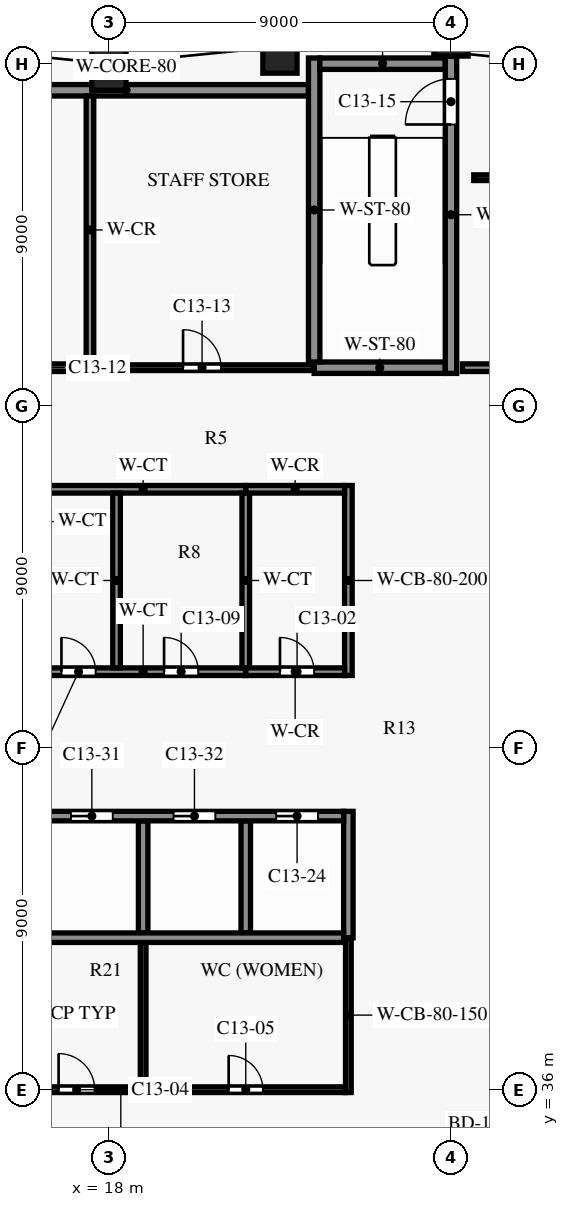
"""IFC4 building model, lengths in metres.
Left out: names, types, materials, properties, quantities, classifications, styles, units other than length and angle.
Written with IfcOpenShell. Run it as: python <this file> out.ifc"""

import sys

from ifc_helpers import new_model, si_unit, direction, frame, frame_2d, origin, origin_2d, place, context, subcontext, project, spatial, rectangle, extrude, element, fill, save


model = new_model("IFC4")
c1 = context("Model", 3, precision=1e-05, world=origin(), true_north=direction((0.0, 1.0)))
c2 = subcontext(c1, "Body", "Model", "MODEL_VIEW")
j1 = project(units=[si_unit("LENGTHUNIT", "METRE"), si_unit("PLANEANGLEUNIT", "RADIAN")], contexts=[c1])
p1 = place(None, origin())
s1 = spatial("IfcSite", under=j1, at=p1, CompositionType="ELEMENT")
p2 = place(p1, origin())
s2 = spatial("IfcBuilding", under=s1, at=p2, CompositionType="ELEMENT")
p3 = place(p2, frame((0.0, 0.0, 84.3)))
s3 = spatial("IfcBuildingStorey", under=s2, at=p3, CompositionType="ELEMENT", Elevation=84.3)
for number, where, z_axis, x_axis in (
    (1, (27.0, 63.9, 0.0), (0.0, 0.0, 1.0), (-1.0, 0.0, 0.0)),
    (2, (22.5, 63.45, 0.0), (0.0, 0.0, 1.0), (-0.995, -0.1, 0.0)),
    (3, (18.0, 63.0, 0.0), (0.0, 0.0, 1.0), (-1.0, 0.0, 0.0)),
):
    element("IfcColumn", number, at=place(p3, frame(where, z_axis=z_axis, x_axis=x_axis)), inside=s3, PredefinedType="COLUMN", context=c2, shape_type="SweptSolid", body=[
        extrude(rectangle(XDim=0.9, YDim=1.4, at=origin_2d()), origin(), (0.0, 0.0, 1.0), 4.2),
    ])
p4 = place(p3, frame((12.4, 36.0, 0.0), z_axis=(0.0, 0.0, 1.0), x_axis=(1.0, 0.0, 0.0)))
e4 = element("IfcWall", 4, at=p4, inside=s3, PredefinedType="SHEAR", context=c2, shape_type="SweptSolid", body=[
    extrude(rectangle(XDim=11.825, YDim=0.15, at=frame_2d((5.913, 0.0))), origin(), (0.0, 0.0, 1.0), 3.9),
])
p5 = place(p4, frame((1.05, 0.0, 0.0)))
e5 = element("IfcOpeningElement", 5, at=p5, cuts=e4, PredefinedType="OPENING", context=c2, shape_type="SweptSolid", body=[
    extrude(rectangle(XDim=0.9, YDim=2.1, at=frame_2d((0.45, 1.05))), frame((0.0, 0.085, 0.0), z_axis=(0.0, -1.0, 0.0), x_axis=(1.0, 0.0, 0.0)), (0.0, 0.0, 1.0), 0.17),
])
p6 = place(p4, frame((4.275, 0.0, 0.0)))
e6 = element("IfcOpeningElement", 6, at=p6, cuts=e4, PredefinedType="OPENING", context=c2, shape_type="SweptSolid", body=[
    extrude(rectangle(XDim=0.95, YDim=2.1, at=frame_2d((0.475, 1.05))), frame((0.0, 0.085, 0.0), z_axis=(0.0, -1.0, 0.0), x_axis=(1.0, 0.0, 0.0)), (0.0, 0.0, 1.0), 0.17),
])
p7 = place(p4, frame((8.75, 0.0, 0.0)))
e7 = element("IfcOpeningElement", 7, at=p7, cuts=e4, PredefinedType="OPENING", context=c2, shape_type="SweptSolid", body=[
    extrude(rectangle(XDim=0.9, YDim=2.1, at=frame_2d((0.45, 1.05))), frame((0.0, 0.085, 0.0), z_axis=(0.0, -1.0, 0.0), x_axis=(1.0, 0.0, 0.0)), (0.0, 0.0, 1.0), 0.17),
])
p8 = place(p3, frame((8.1, 40.0, 0.0), z_axis=(0.0, 0.0, 1.0), x_axis=(1.0, 0.0, 0.0)))
e8 = element("IfcWall", 8, at=p8, inside=s3, PredefinedType="SHEAR", context=c2, shape_type="SweptSolid", body=[
    extrude(rectangle(XDim=16.075, YDim=0.25, at=frame_2d((8.038, 0.0))), origin(), (0.0, 0.0, 1.0), 3.9),
])
p9 = place(p3, frame((8.1, 43.2, 0.0), z_axis=(0.0, 0.0, 1.0), x_axis=(1.0, 0.0, 0.0)))
e9 = element("IfcWall", 9, at=p9, inside=s3, PredefinedType="SHEAR", context=c2, shape_type="SweptSolid", body=[
    extrude(rectangle(XDim=16.075, YDim=0.25, at=frame_2d((8.038, 0.0))), origin(), (0.0, 0.0, 1.0), 3.9),
])
p10 = place(p9, frame((14.3, 0.0, 0.0)))
e10 = element("IfcOpeningElement", 10, at=p10, cuts=e9, PredefinedType="OPENING", context=c2, shape_type="SweptSolid", body=[
    extrude(rectangle(XDim=1.1, YDim=2.1, at=frame_2d((0.55, 1.05))), frame((0.0, 0.135, 0.0), z_axis=(0.0, -1.0, 0.0), x_axis=(1.0, 0.0, 0.0)), (0.0, 0.0, 1.0), 0.27),
])
p11 = place(p9, frame((0.8, 0.0, 0.0)))
e11 = element("IfcOpeningElement", 11, at=p11, cuts=e9, PredefinedType="OPENING", context=c2, shape_type="SweptSolid", body=[
    extrude(rectangle(XDim=1.1, YDim=2.1, at=frame_2d((0.55, 1.05))), frame((0.0, 0.135, 0.0), z_axis=(0.0, -1.0, 0.0), x_axis=(1.0, 0.0, 0.0)), (0.0, 0.0, 1.0), 0.27),
])
p12 = place(p9, frame((3.5, 0.0, 0.0)))
e12 = element("IfcOpeningElement", 12, at=p12, cuts=e9, PredefinedType="OPENING", context=c2, shape_type="SweptSolid", body=[
    extrude(rectangle(XDim=1.1, YDim=2.1, at=frame_2d((0.55, 1.05))), frame((0.0, 0.135, 0.0), z_axis=(0.0, -1.0, 0.0), x_axis=(1.0, 0.0, 0.0)), (0.0, 0.0, 1.0), 0.27),
])
p13 = place(p9, frame((6.2, 0.0, 0.0)))
e13 = element("IfcOpeningElement", 13, at=p13, cuts=e9, PredefinedType="OPENING", context=c2, shape_type="SweptSolid", body=[
    extrude(rectangle(XDim=1.1, YDim=2.1, at=frame_2d((0.55, 1.05))), frame((0.0, 0.135, 0.0), z_axis=(0.0, -1.0, 0.0), x_axis=(1.0, 0.0, 0.0)), (0.0, 0.0, 1.0), 0.27),
])
p14 = place(p9, frame((8.9, 0.0, 0.0)))
e14 = element("IfcOpeningElement", 14, at=p14, cuts=e9, PredefinedType="OPENING", context=c2, shape_type="SweptSolid", body=[
    extrude(rectangle(XDim=1.1, YDim=2.1, at=frame_2d((0.55, 1.05))), frame((0.0, 0.135, 0.0), z_axis=(0.0, -1.0, 0.0), x_axis=(1.0, 0.0, 0.0)), (0.0, 0.0, 1.0), 0.27),
])
p15 = place(p9, frame((11.6, 0.0, 0.0)))
e15 = element("IfcOpeningElement", 15, at=p15, cuts=e9, PredefinedType="OPENING", context=c2, shape_type="SweptSolid", body=[
    extrude(rectangle(XDim=1.1, YDim=2.1, at=frame_2d((0.55, 1.05))), frame((0.0, 0.135, 0.0), z_axis=(0.0, -1.0, 0.0), x_axis=(1.0, 0.0, 0.0)), (0.0, 0.0, 1.0), 0.27),
])
p16 = place(p3, frame((16.2, 47.0, 0.0), z_axis=(0.0, 0.0, 1.0), x_axis=(1.0, 0.0, 0.0)))
e16 = element("IfcWall", 16, at=p16, inside=s3, PredefinedType="PARTITIONING", context=c2, shape_type="SweptSolid", body=[
    extrude(rectangle(XDim=5.4, YDim=0.2, at=frame_2d((2.7, 0.0))), origin(), (0.0, 0.0, 1.0), 3.9),
])
p17 = place(p16, frame((0.55, 0.0, 0.0)))
e17 = element("IfcOpeningElement", 17, at=p17, cuts=e16, PredefinedType="OPENING", context=c2, shape_type="SweptSolid", body=[
    extrude(rectangle(XDim=0.9, YDim=2.1, at=frame_2d((0.45, 1.05))), frame((0.0, 0.11, 0.0), z_axis=(0.0, -1.0, 0.0), x_axis=(1.0, 0.0, 0.0)), (0.0, 0.0, 1.0), 0.22),
])
p18 = place(p16, frame((3.25, 0.0, 0.0)))
e18 = element("IfcOpeningElement", 18, at=p18, cuts=e16, PredefinedType="OPENING", context=c2, shape_type="SweptSolid", body=[
    extrude(rectangle(XDim=0.9, YDim=2.1, at=frame_2d((0.45, 1.05))), frame((0.0, 0.11, 0.0), z_axis=(0.0, -1.0, 0.0), x_axis=(1.0, 0.0, 0.0)), (0.0, 0.0, 1.0), 0.22),
])
p19 = place(p3, frame((21.6, 47.0, 0.0), z_axis=(0.0, 0.0, 1.0), x_axis=(1.0, 0.0, 0.0)))
e19 = element("IfcWall", 19, at=p19, inside=s3, PredefinedType="PARTITIONING", context=c2, shape_type="SweptSolid", body=[
    extrude(rectangle(XDim=2.6, YDim=0.2, at=frame_2d((1.3, 0.0))), origin(), (0.0, 0.0, 1.0), 3.9),
])
p20 = place(p19, frame((0.9, 0.0, 0.0)))
e20 = element("IfcOpeningElement", 20, at=p20, cuts=e19, PredefinedType="OPENING", context=c2, shape_type="SweptSolid", body=[
    extrude(rectangle(XDim=0.9, YDim=2.1, at=frame_2d((0.45, 1.05))), frame((0.0, 0.11, 0.0), z_axis=(0.0, -1.0, 0.0), x_axis=(1.0, 0.0, 0.0)), (0.0, 0.0, 1.0), 0.22),
])
p21 = place(p3, frame((16.2, 51.8, 0.0), z_axis=(0.0, 0.0, 1.0), x_axis=(1.0, 0.0, 0.0)))
e21 = element("IfcWall", 21, at=p21, inside=s3, PredefinedType="PARTITIONING", context=c2, shape_type="SweptSolid", body=[
    extrude(rectangle(XDim=5.4, YDim=0.2, at=frame_2d((2.7, 0.0))), origin(), (0.0, 0.0, 1.0), 3.9),
])
p22 = place(p3, frame((21.6, 51.8, 0.0), z_axis=(0.0, 0.0, 1.0), x_axis=(1.0, 0.0, 0.0)))
e22 = element("IfcWall", 22, at=p22, inside=s3, PredefinedType="PARTITIONING", context=c2, shape_type="SweptSolid", body=[
    extrude(rectangle(XDim=2.6, YDim=0.2, at=frame_2d((1.3, 0.0))), origin(), (0.0, 0.0, 1.0), 3.9),
])
p23 = place(p3, frame((17.5, 55.0, 0.0), z_axis=(0.0, 0.0, 1.0), x_axis=(1.0, 0.0, 0.0)))
e23 = element("IfcWall", 23, at=p23, inside=s3, PredefinedType="PARTITIONING", context=c2, shape_type="SweptSolid", body=[
    extrude(rectangle(XDim=5.9, YDim=0.15, at=frame_2d((2.95, 0.0))), origin(), (0.0, 0.0, 1.0), 3.9),
])
p24 = place(p23, frame((2.45, 0.0, 0.0)))
e24 = element("IfcOpeningElement", 24, at=p24, cuts=e23, PredefinedType="OPENING", context=c2, shape_type="SweptSolid", body=[
    extrude(rectangle(XDim=1.0, YDim=2.1, at=frame_2d((0.5, 1.05))), frame((0.0, 0.085, 0.0), z_axis=(0.0, -1.0, 0.0), x_axis=(1.0, 0.0, 0.0)), (0.0, 0.0, 1.0), 0.17),
])
p25 = place(p3, frame((13.5, 55.0, 0.0), z_axis=(0.0, 0.0, 1.0), x_axis=(1.0, 0.0, 0.0)))
e25 = element("IfcWall", 25, at=p25, inside=s3, PredefinedType="PARTITIONING", context=c2, shape_type="SweptSolid", body=[
    extrude(rectangle(XDim=4.0, YDim=0.2, at=frame_2d((2.0, 0.0))), origin(), (0.0, 0.0, 1.0), 3.9),
])
p26 = place(p25, frame((1.5, 0.0, 0.0)))
e26 = element("IfcOpeningElement", 26, at=p26, cuts=e25, PredefinedType="OPENING", context=c2, shape_type="SweptSolid", body=[
    extrude(rectangle(XDim=1.0, YDim=2.1, at=frame_2d((0.5, 1.05))), frame((0.0, 0.11, 0.0), z_axis=(0.0, -1.0, 0.0), x_axis=(1.0, 0.0, 0.0)), (0.0, 0.0, 1.0), 0.22),
])
p27 = place(p3, frame((23.4, 55.0, 0.0), z_axis=(0.0, 0.0, 1.0), x_axis=(1.0, 0.0, 0.0)))
e27 = element("IfcWall", 27, at=p27, inside=s3, PredefinedType="SHEAR", context=c2, shape_type="SweptSolid", body=[
    extrude(rectangle(XDim=3.45, YDim=0.3, at=frame_2d((1.725, 0.0))), origin(), (0.0, 0.0, 1.0), 3.9),
])
p28 = place(p3, frame((13.65, 62.3, 0.0), z_axis=(0.0, 0.0, 1.0), x_axis=(1.0, 0.0, 0.0)))
e28 = element("IfcWall", 28, at=p28, inside=s3, PredefinedType="SHEAR", context=c2, shape_type="SweptSolid", body=[
    extrude(rectangle(XDim=9.6, YDim=0.3, at=frame_2d((4.8, 0.0))), origin(), (0.0, 0.0, 1.0), 3.9),
])
p29 = place(p3, frame((23.55, 63.0, 0.0), z_axis=(0.0, 0.0, 1.0), x_axis=(1.0, 0.0, 0.0)))
e29 = element("IfcWall", 29, at=p29, inside=s3, PredefinedType="SHEAR", context=c2, shape_type="SweptSolid", body=[
    extrude(rectangle(XDim=3.3, YDim=0.3, at=frame_2d((1.65, 0.0))), origin(), (0.0, 0.0, 1.0), 3.9),
])
p30 = place(p3, frame((17.5, 55.1, 0.0), z_axis=(0.0, 0.0, 1.0), x_axis=(0.0, 1.0, 0.0)))
e30 = element("IfcWall", 30, at=p30, inside=s3, PredefinedType="PARTITIONING", context=c2, shape_type="SweptSolid", body=[
    extrude(rectangle(XDim=7.05, YDim=0.2, at=frame_2d((3.525, 0.0))), origin(), (0.0, 0.0, 1.0), 3.9),
])
p31 = place(p3, frame((18.2, 47.1, 0.0), z_axis=(0.0, 0.0, 1.0), x_axis=(0.0, 1.0, 0.0)))
e31 = element("IfcWall", 31, at=p31, inside=s3, PredefinedType="PARTITIONING", context=c2, shape_type="SweptSolid", body=[
    extrude(rectangle(XDim=4.6, YDim=0.2, at=frame_2d((2.3, 0.0))), origin(), (0.0, 0.0, 1.0), 3.9),
])
p32 = place(p3, frame((18.9, 36.075, 0.0), z_axis=(0.0, 0.0, 1.0), x_axis=(0.0, 1.0, 0.0)))
e32 = element("IfcWall", 32, at=p32, inside=s3, PredefinedType="PARTITIONING", context=c2, shape_type="SweptSolid", body=[
    extrude(rectangle(XDim=3.8, YDim=0.15, at=frame_2d((1.9, 0.0))), origin(), (0.0, 0.0, 1.0), 3.9),
])
p33 = place(p3, frame((18.9, 40.125, 0.0), z_axis=(0.0, 0.0, 1.0), x_axis=(0.0, 1.0, 0.0)))
e33 = element("IfcWall", 33, at=p33, inside=s3, PredefinedType="SHEAR", context=c2, shape_type="SweptSolid", body=[
    extrude(rectangle(XDim=2.95, YDim=0.25, at=frame_2d((1.475, 0.0))), origin(), (0.0, 0.0, 1.0), 3.9),
])
p34 = place(p3, frame((21.6, 47.1, 0.0), z_axis=(0.0, 0.0, 1.0), x_axis=(0.0, 1.0, 0.0)))
e34 = element("IfcWall", 34, at=p34, inside=s3, PredefinedType="PARTITIONING", context=c2, shape_type="SweptSolid", body=[
    extrude(rectangle(XDim=4.6, YDim=0.2, at=frame_2d((2.3, 0.0))), origin(), (0.0, 0.0, 1.0), 3.9),
])
p35 = place(p3, frame((21.6, 40.125, 0.0), z_axis=(0.0, 0.0, 1.0), x_axis=(0.0, 1.0, 0.0)))
e35 = element("IfcWall", 35, at=p35, inside=s3, PredefinedType="SHEAR", context=c2, shape_type="SweptSolid", body=[
    extrude(rectangle(XDim=2.95, YDim=0.25, at=frame_2d((1.475, 0.0))), origin(), (0.0, 0.0, 1.0), 3.9),
])
p36 = place(p3, frame((23.4, 55.15, 0.0), z_axis=(0.0, 0.0, 1.0), x_axis=(0.0, 1.0, 0.0)))
e36 = element("IfcWall", 36, at=p36, inside=s3, PredefinedType="SHEAR", context=c2, shape_type="SweptSolid", body=[
    extrude(rectangle(XDim=8.0, YDim=0.3, at=frame_2d((4.0, 0.0))), origin(), (0.0, 0.0, 1.0), 3.9),
])
p37 = place(p3, frame((24.3, 35.925, 0.0), z_axis=(0.0, 0.0, 1.0), x_axis=(0.0, 1.0, 0.0)))
e37 = element("IfcWall", 37, at=p37, inside=s3, PredefinedType="SHEAR", context=c2, shape_type="SweptSolid", body=[
    extrude(rectangle(XDim=4.075, YDim=0.15, at=frame_2d((2.038, 0.0))), origin(), (0.0, 0.0, 1.0), 3.9),
])
p38 = place(p3, frame((24.3, 46.9, 0.0), z_axis=(0.0, 0.0, 1.0), x_axis=(0.0, 1.0, 0.0)))
e38 = element("IfcWall", 38, at=p38, inside=s3, PredefinedType="SHEAR", context=c2, shape_type="SweptSolid", body=[
    extrude(rectangle(XDim=5.0, YDim=0.2, at=frame_2d((2.5, 0.0))), origin(), (0.0, 0.0, 1.0), 3.9),
])
p39 = place(p3, frame((24.3, 40.0, 0.0), z_axis=(0.0, 0.0, 1.0), x_axis=(0.0, 1.0, 0.0)))
e39 = element("IfcWall", 39, at=p39, inside=s3, PredefinedType="SHEAR", context=c2, shape_type="SweptSolid", body=[
    extrude(rectangle(XDim=3.325, YDim=0.25, at=frame_2d((1.663, 0.0))), origin(), (0.0, 0.0, 1.0), 3.9),
])
p40 = place(p3, frame((27.0, 54.85, 0.0), z_axis=(0.0, 0.0, 1.0), x_axis=(0.0, 1.0, 0.0)))
e40 = element("IfcWall", 40, at=p40, inside=s3, PredefinedType="SHEAR", context=c2, shape_type="SweptSolid", body=[
    extrude(rectangle(XDim=8.35, YDim=0.3, at=frame_2d((4.175, 0.0))), origin(), (0.0, 0.0, 1.0), 3.9),
])
p41 = place(p40, frame((6.55, 0.0, 0.0)))
e41 = element("IfcOpeningElement", 41, at=p41, cuts=e40, PredefinedType="OPENING", context=c2, shape_type="SweptSolid", body=[
    extrude(rectangle(XDim=1.2, YDim=2.2, at=frame_2d((0.6, 1.1))), frame((0.0, 0.16, 0.0), z_axis=(0.0, -1.0, 0.0), x_axis=(1.0, 0.0, 0.0)), (0.0, 0.0, 1.0), 0.32),
])
p42 = place(p3, frame((27.3, 55.0, 0.0), z_axis=(0.0, 0.0, 1.0), x_axis=(1.0, 0.0, 0.0)))
e42 = element("IfcWall", 42, at=p42, inside=s3, PredefinedType="PARTITIONING", context=c2, shape_type="SweptSolid", body=[
    extrude(rectangle(XDim=4.3, YDim=0.2, at=frame_2d((2.15, 0.0))), origin(), (0.0, 0.0, 1.0), 3.88),
])
p43 = place(p42, frame((1.625, 0.0, 0.0)))
e43 = element("IfcOpeningElement", 43, at=p43, cuts=e42, PredefinedType="OPENING", context=c2, shape_type="SweptSolid", body=[
    extrude(rectangle(XDim=1.0, YDim=2.1, at=frame_2d((0.5, 1.05))), frame((0.0, 0.11, 0.0), z_axis=(0.0, -1.0, 0.0), x_axis=(1.0, 0.0, 0.0)), (0.0, 0.0, 1.0), 0.22),
])
p44 = place(p20, origin())
e44 = element("IfcDoor", 44, at=p44, inside=s3, OperationType="SINGLE_SWING_LEFT", PredefinedType="DOOR", context=c2, shape_type="SweptSolid", body=[
    extrude(rectangle(XDim=0.9, YDim=2.1, at=frame_2d((0.45, 1.05))), frame((0.0, 0.025, 0.0), z_axis=(0.0, -1.0, 0.0), x_axis=(1.0, 0.0, 0.0)), (0.0, 0.0, 1.0), 0.05),
])
fill(e20, e44)
p45 = place(p6, origin())
e45 = element("IfcDoor", 45, at=p45, inside=s3, OperationType="SINGLE_SWING_LEFT", PredefinedType="DOOR", context=c2, shape_type="SweptSolid", body=[
    extrude(rectangle(XDim=0.95, YDim=2.1, at=frame_2d((0.475, 1.05))), frame((0.0, 0.025, 0.0), z_axis=(0.0, -1.0, 0.0), x_axis=(1.0, 0.0, 0.0)), (0.0, 0.0, 1.0), 0.05),
])
fill(e6, e45)
p46 = place(p7, origin())
e46 = element("IfcDoor", 46, at=p46, inside=s3, OperationType="SINGLE_SWING_RIGHT", PredefinedType="DOOR", context=c2, shape_type="SweptSolid", body=[
    extrude(rectangle(XDim=0.9, YDim=2.1, at=frame_2d((0.45, 1.05))), frame((0.0, 0.025, 0.0), z_axis=(0.0, -1.0, 0.0), x_axis=(1.0, 0.0, 0.0)), (0.0, 0.0, 1.0), 0.05),
])
fill(e7, e46)
p47 = place(p17, origin())
e47 = element("IfcDoor", 47, at=p47, inside=s3, OperationType="SINGLE_SWING_LEFT", PredefinedType="DOOR", context=c2, shape_type="SweptSolid", body=[
    extrude(rectangle(XDim=0.9, YDim=2.1, at=frame_2d((0.45, 1.05))), frame((0.0, 0.025, 0.0), z_axis=(0.0, -1.0, 0.0), x_axis=(1.0, 0.0, 0.0)), (0.0, 0.0, 1.0), 0.05),
])
fill(e17, e47)
p48 = place(p18, origin())
e48 = element("IfcDoor", 48, at=p48, inside=s3, OperationType="SINGLE_SWING_RIGHT", PredefinedType="DOOR", context=c2, shape_type="SweptSolid", body=[
    extrude(rectangle(XDim=0.9, YDim=2.1, at=frame_2d((0.45, 1.05))), frame((0.0, 0.025, 0.0), z_axis=(0.0, -1.0, 0.0), x_axis=(1.0, 0.0, 0.0)), (0.0, 0.0, 1.0), 0.05),
])
fill(e18, e48)
p49 = place(p24, origin())
e49 = element("IfcDoor", 49, at=p49, inside=s3, OperationType="SINGLE_SWING_RIGHT", PredefinedType="DOOR", context=c2, shape_type="SweptSolid", body=[
    extrude(rectangle(XDim=1.0, YDim=2.1, at=frame_2d((0.5, 1.05))), frame((0.0, 0.025, 0.0), z_axis=(0.0, -1.0, 0.0), x_axis=(1.0, 0.0, 0.0)), (0.0, 0.0, 1.0), 0.05),
])
fill(e24, e49)
p50 = place(p41, origin())
e50 = element("IfcDoor", 50, at=p50, inside=s3, OperationType="SINGLE_SWING_LEFT", PredefinedType="DOOR", context=c2, shape_type="SweptSolid", body=[
    extrude(rectangle(XDim=1.2, YDim=2.2, at=frame_2d((0.6, 1.1))), frame((0.0, 0.025, 0.0), z_axis=(0.0, -1.0, 0.0), x_axis=(1.0, 0.0, 0.0)), (0.0, 0.0, 1.0), 0.05),
])
fill(e41, e50)
p51 = place(p10, origin())
e51 = element("IfcDoor", 51, at=p51, inside=s3, OperationType="DOUBLE_DOOR_SLIDING", PredefinedType="DOOR", context=c2, shape_type="SweptSolid", body=[
    extrude(rectangle(XDim=1.1, YDim=2.1, at=frame_2d((0.55, 1.05))), frame((0.0, 0.025, 0.0), z_axis=(0.0, -1.0, 0.0), x_axis=(1.0, 0.0, 0.0)), (0.0, 0.0, 1.0), 0.05),
])
fill(e10, e51)
p52 = place(p14, origin())
e52 = element("IfcDoor", 52, at=p52, inside=s3, OperationType="DOUBLE_DOOR_SLIDING", PredefinedType="DOOR", context=c2, shape_type="SweptSolid", body=[
    extrude(rectangle(XDim=1.1, YDim=2.1, at=frame_2d((0.55, 1.05))), frame((0.0, 0.025, 0.0), z_axis=(0.0, -1.0, 0.0), x_axis=(1.0, 0.0, 0.0)), (0.0, 0.0, 1.0), 0.05),
])
fill(e14, e52)
p53 = place(p15, origin())
e53 = element("IfcDoor", 53, at=p53, inside=s3, OperationType="DOUBLE_DOOR_SLIDING", PredefinedType="DOOR", context=c2, shape_type="SweptSolid", body=[
    extrude(rectangle(XDim=1.1, YDim=2.1, at=frame_2d((0.55, 1.05))), frame((0.0, 0.025, 0.0), z_axis=(0.0, -1.0, 0.0), x_axis=(1.0, 0.0, 0.0)), (0.0, 0.0, 1.0), 0.05),
])
fill(e15, e53)
save(model, sys.argv[1])
